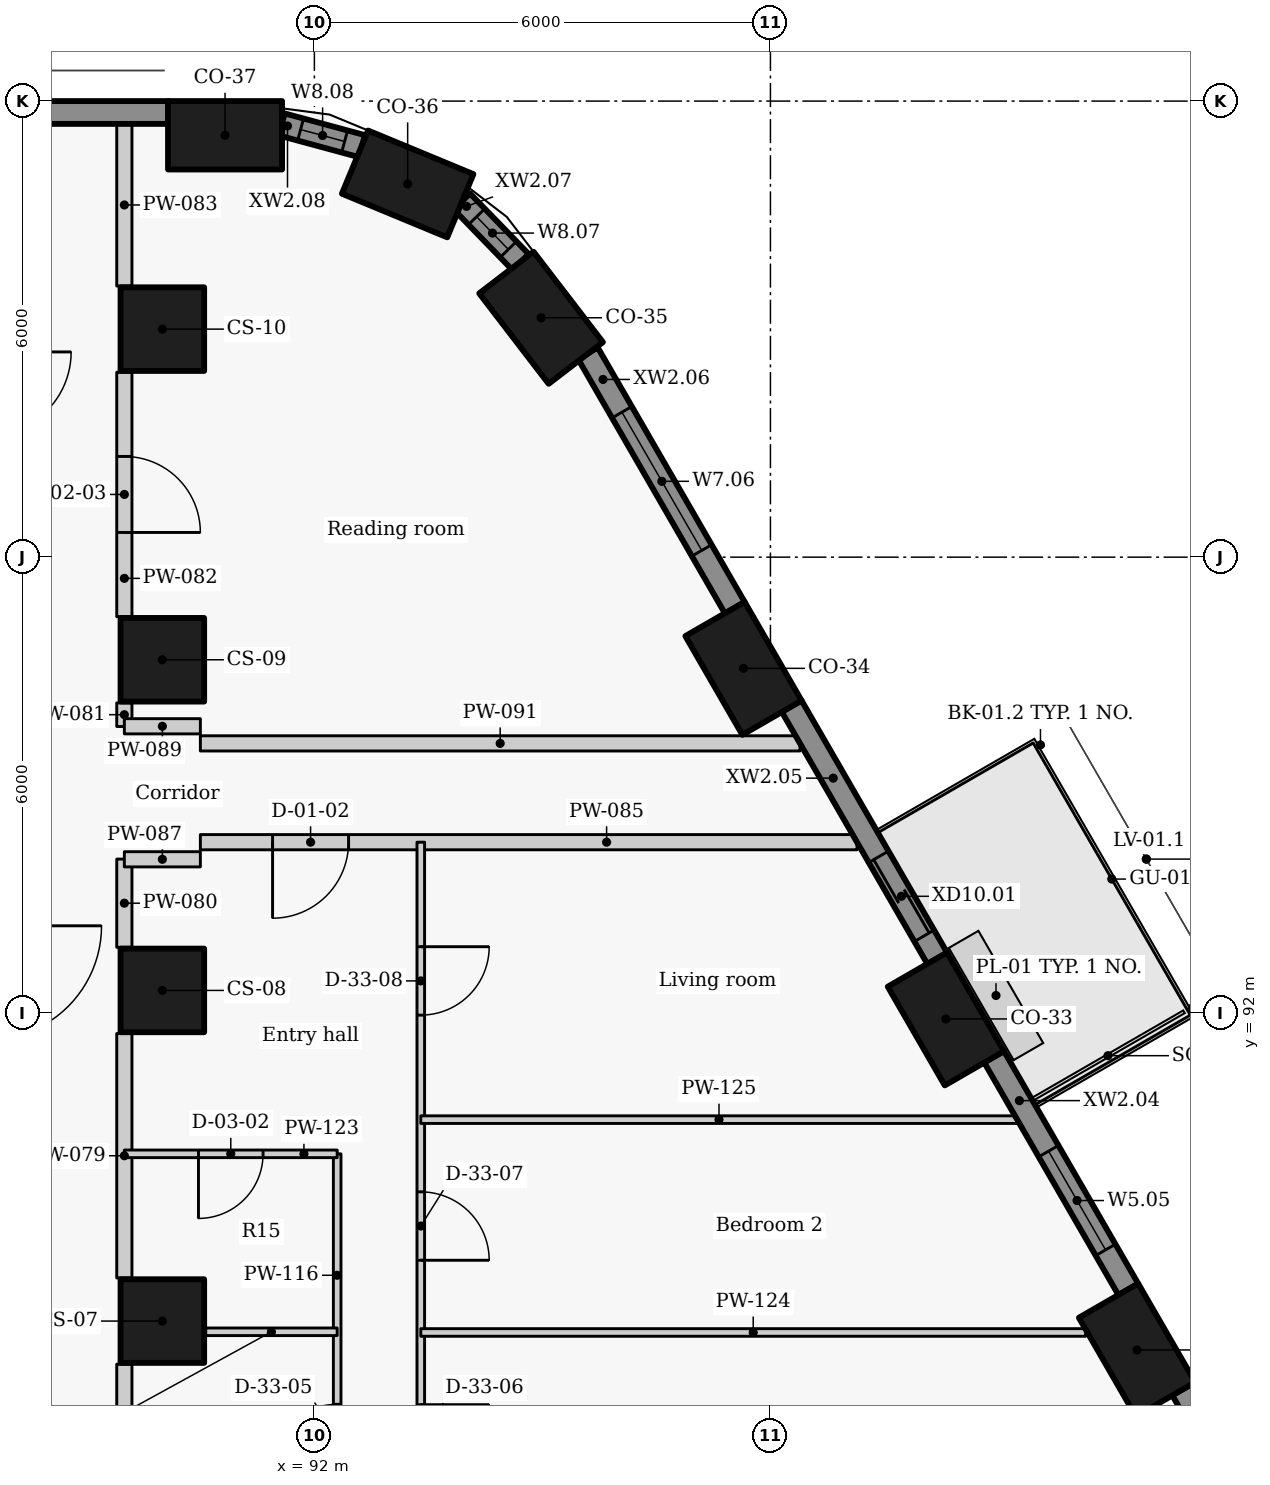
"""IFC4 building model, lengths in metres.
Left out: names, types, materials, properties, quantities, classifications, styles, units other than length and angle.
Written with IfcOpenShell. Run it as: python <this file> out.ifc"""

import sys

from ifc_helpers import new_model, si_unit, direction, frame, frame_2d, origin, origin_2d, place, context, subcontext, project, spatial, rectangle, extrude, element, fill, save


model = new_model("IFC4")
c1 = context("Model", 3, precision=1e-05, world=origin(), true_north=direction((0.0, 1.0)))
c2 = subcontext(c1, "Body", "Model", "MODEL_VIEW")
j1 = project(units=[si_unit("LENGTHUNIT", "METRE"), si_unit("PLANEANGLEUNIT", "RADIAN")], contexts=[c1])
p1 = place(None, origin())
s1 = spatial("IfcSite", under=j1, at=p1, CompositionType="ELEMENT")
p2 = place(p1, origin())
s2 = spatial("IfcBuilding", under=s1, at=p2, CompositionType="ELEMENT")
p3 = place(p2, frame((0.0, 0.0, 61.2)))
s3 = spatial("IfcBuildingStorey", under=s2, at=p3, CompositionType="ELEMENT", Elevation=61.2)
for number, where, z_axis, x_axis in (
    (1, (102.823, 87.57, 0.0), (0.0, 0.0, 1.0), (-0.5, 0.866, 0.0)),
    (2, (100.308, 91.925, 0.0), (0.0, 0.0, 1.0), (-0.5, 0.866, 0.0)),
    (3, (97.646, 96.537, 0.0), (0.0, 0.0, 1.0), (-0.5, 0.866, 0.0)),
    (4, (94.982, 101.149, 0.0), (0.0, 0.0, 1.0), (-0.609, 0.793, 0.0)),
    (5, (93.227, 102.91, 0.0), (0.0, 0.0, 1.0), (-0.924, 0.383, 0.0)),
    (6, (90.825, 103.55, 0.0), (0.0, 0.0, 1.0), (-1.0, 0.0, 0.0)),
):
    element("IfcColumn", number, at=place(p3, frame(where, z_axis=z_axis, x_axis=x_axis)), inside=s3, PredefinedType="COLUMN", context=c2, shape_type="SweptSolid", body=[
        extrude(rectangle(XDim=1.5, YDim=0.9, at=origin_2d()), origin(), (0.0, 0.0, 1.0), 3.3),
    ])
for number, where, z_axis, x_axis in (
    (7, (90.0, 87.95, 0.0), (0.0, 0.0, 1.0), (0.0, 1.0, 0.0)),
    (8, (90.0, 92.3, 0.0), (0.0, 0.0, 1.0), (0.0, 1.0, 0.0)),
    (9, (90.0, 96.65, 0.0), (0.0, 0.0, 1.0), (0.0, 1.0, 0.0)),
    (10, (90.0, 101.0, 0.0), (0.0, 0.0, 1.0), (0.0, 1.0, 0.0)),
):
    element("IfcColumn", number, at=place(p3, frame(where, z_axis=z_axis, x_axis=x_axis)), inside=s3, PredefinedType="COLUMN", context=c2, shape_type="SweptSolid", body=[
        extrude(rectangle(XDim=1.1, YDim=1.1, at=origin_2d()), origin(), (0.0, 0.0, 1.0), 3.3),
    ])
p4 = place(p3, frame((106.186, 82.153, 0.0), z_axis=(0.0, 0.0, 1.0), x_axis=(-0.492363204642, 0.870389840655, 0.0)))
e11 = element("IfcWall", 11, at=p4, inside=s3, PredefinedType="SOLIDWALL", context=c2, shape_type="SweptSolid", body=[
    extrude(rectangle(XDim=5.626, YDim=0.3, at=frame_2d((2.813, 0.0))), origin(), (0.0, 0.0, 1.0), 2.425),
])
p5 = place(p4, frame((0.909, 0.0, 0.9)))
e12 = element("IfcOpeningElement", 12, at=p5, cuts=e11, PredefinedType="OPENING", context=c2, shape_type="SweptSolid", body=[
    extrude(rectangle(XDim=2.1, YDim=1.1, at=frame_2d((1.05, 0.55))), frame((0.0, 0.16, 0.0), z_axis=(0.0, -1.0, 0.0), x_axis=(1.0, 0.0, 0.0)), (0.0, 0.0, 1.0), 0.32),
])
p6 = place(p4, frame((3.734, 0.0, 0.9)))
e13 = element("IfcOpeningElement", 13, at=p6, cuts=e11, PredefinedType="OPENING", context=c2, shape_type="SweptSolid", body=[
    extrude(rectangle(XDim=1.5, YDim=1.1, at=frame_2d((0.75, 0.55))), frame((0.0, 0.16, 0.0), z_axis=(0.0, -1.0, 0.0), x_axis=(1.0, 0.0, 0.0)), (0.0, 0.0, 1.0), 0.32),
])
p7 = place(p3, frame((102.71, 88.366, 0.0), z_axis=(0.0, 0.0, 1.0), x_axis=(-0.499977402622, 0.866038449993, 0.0)))
e14 = element("IfcWall", 14, at=p7, inside=s3, PredefinedType="SOLIDWALL", context=c2, shape_type="SweptSolid", body=[
    extrude(rectangle(XDim=3.537, YDim=0.3, at=frame_2d((1.769, 0.0))), origin(), (0.0, 0.0, 1.0), 2.425),
])
p8 = place(p7, frame((0.601, 0.0, 0.9)))
e15 = element("IfcOpeningElement", 15, at=p8, cuts=e14, PredefinedType="OPENING", context=c2, shape_type="SweptSolid", body=[
    extrude(rectangle(XDim=1.5, YDim=1.1, at=frame_2d((0.75, 0.55))), frame((0.0, 0.16, 0.0), z_axis=(0.0, -1.0, 0.0), x_axis=(1.0, 0.0, 0.0)), (0.0, 0.0, 1.0), 0.32),
])
p9 = place(p3, frame((100.195, 92.721, 0.0), z_axis=(0.0, 0.0, 1.0), x_axis=(-0.500001735503, 0.866024401789, 0.0)))
e16 = element("IfcWall", 16, at=p9, inside=s3, PredefinedType="SOLIDWALL", context=c2, shape_type="SweptSolid", body=[
    extrude(rectangle(XDim=3.834, YDim=0.3, at=frame_2d((1.917, 0.0))), origin(), (0.0, 0.0, 1.0), 2.425),
])
p10 = place(p9, frame((0.344, 0.0, 0.0)))
e17 = element("IfcOpeningElement", 17, at=p10, cuts=e16, PredefinedType="OPENING", context=c2, shape_type="SweptSolid", body=[
    extrude(rectangle(XDim=1.2, YDim=2.0, at=frame_2d((0.6, 1.0))), frame((0.0, 0.16, 0.0), z_axis=(0.0, -1.0, 0.0), x_axis=(1.0, 0.0, 0.0)), (0.0, 0.0, 1.0), 0.32),
])
p11 = place(p3, frame((97.532, 97.333, 0.0), z_axis=(0.0, 0.0, 1.0), x_axis=(-0.499948341072, 0.866055227026, 0.0)))
e18 = element("IfcWall", 18, at=p11, inside=s3, PredefinedType="SOLIDWALL", context=c2, shape_type="SweptSolid", body=[
    extrude(rectangle(XDim=3.867, YDim=0.3, at=frame_2d((1.934, 0.0))), origin(), (0.0, 0.0, 1.0), 2.425),
])
p12 = place(p11, frame((0.872, 0.0, 0.9)))
e19 = element("IfcOpeningElement", 19, at=p12, cuts=e18, PredefinedType="OPENING", context=c2, shape_type="SweptSolid", body=[
    extrude(rectangle(XDim=2.1, YDim=1.1, at=frame_2d((1.05, 0.55))), frame((0.0, 0.16, 0.0), z_axis=(0.0, -1.0, 0.0), x_axis=(1.0, 0.0, 0.0)), (0.0, 0.0, 1.0), 0.32),
])
p13 = place(p3, frame((94.713, 101.883, 0.0), z_axis=(0.0, 0.0, 1.0), x_axis=(-0.696138968055, 0.717907053285, 0.0)))
e20 = element("IfcWall", 20, at=p13, inside=s3, PredefinedType="SOLIDWALL", context=c2, shape_type="SweptSolid", body=[
    extrude(rectangle(XDim=1.11, YDim=0.3, at=frame_2d((0.555, 0.0))), origin(), (0.0, 0.0, 1.0), 2.425),
])
p14 = place(p13, frame((0.231, 0.0, 0.9)))
e21 = element("IfcOpeningElement", 21, at=p14, cuts=e20, PredefinedType="OPENING", context=c2, shape_type="SweptSolid", body=[
    extrude(rectangle(XDim=0.6, YDim=1.1, at=frame_2d((0.3, 0.55))), frame((0.0, 0.16, 0.0), z_axis=(0.0, -1.0, 0.0), x_axis=(1.0, 0.0, 0.0)), (0.0, 0.0, 1.0), 0.32),
])
p15 = place(p3, frame((92.625, 103.407, 0.0), z_axis=(0.0, 0.0, 1.0), x_axis=(-0.96522637192, 0.261415475728, 0.0)))
e22 = element("IfcWall", 22, at=p15, inside=s3, PredefinedType="SOLIDWALL", context=c2, shape_type="SweptSolid", body=[
    extrude(rectangle(XDim=1.093, YDim=0.3, at=frame_2d((0.546, 0.0))), origin(), (0.0, 0.0, 1.0), 2.425),
])
p16 = place(p15, frame((0.236, 0.0, 0.9)))
e23 = element("IfcOpeningElement", 23, at=p16, cuts=e22, PredefinedType="OPENING", context=c2, shape_type="SweptSolid", body=[
    extrude(rectangle(XDim=0.6, YDim=1.1, at=frame_2d((0.3, 0.55))), frame((0.0, 0.16, 0.0), z_axis=(0.0, -1.0, 0.0), x_axis=(1.0, 0.0, 0.0)), (0.0, 0.0, 1.0), 0.32),
])
p17 = place(p3, frame((90.079, 103.85, 0.0), z_axis=(0.0, 0.0, 1.0), x_axis=(-1.0, 0.0, 0.0)))
e24 = element("IfcWall", 24, at=p17, inside=s3, PredefinedType="SOLIDWALL", context=c2, shape_type="SweptSolid", body=[
    extrude(rectangle(XDim=20.19, YDim=0.3, at=frame_2d((10.095, 0.0))), origin(), (0.0, 0.0, 1.0), 2.425),
])
p18 = place(p3, frame((89.5, 87.383, 0.0), z_axis=(0.0, 0.0, 1.0), x_axis=(0.0, -1.0, 0.0)))
e25 = element("IfcWall", 25, at=p18, inside=s3, PredefinedType="PARTITIONING", context=c2, shape_type="SweptSolid", body=[
    extrude(rectangle(XDim=3.986, YDim=0.2, at=frame_2d((1.993, 0.0))), origin(), (0.0, 0.0, 1.0), 3.025),
])
p19 = place(p18, frame((2.683, 0.0, 0.0)))
e26 = element("IfcOpeningElement", 26, at=p19, cuts=e25, PredefinedType="OPENING", context=c2, shape_type="SweptSolid", body=[
    extrude(rectangle(XDim=1.0, YDim=2.1, at=frame_2d((0.5, 1.05))), frame((0.0, 0.11, 0.0), z_axis=(0.0, -1.0, 0.0), x_axis=(1.0, 0.0, 0.0)), (0.0, 0.0, 1.0), 0.22),
])
p20 = place(p3, frame((89.5, 88.517, 0.0), z_axis=(0.0, 0.0, 1.0), x_axis=(0.0, 1.0, 0.0)))
e27 = element("IfcWall", 27, at=p20, inside=s3, PredefinedType="PARTITIONING", context=c2, shape_type="SweptSolid", body=[
    extrude(rectangle(XDim=3.216, YDim=0.2, at=frame_2d((1.608, 0.0))), origin(), (0.0, 0.0, 1.0), 3.025),
])
p21 = place(p3, frame((89.5, 92.867, 0.0), z_axis=(0.0, 0.0, 1.0), x_axis=(0.0, 1.0, 0.0)))
e28 = element("IfcWall", 28, at=p21, inside=s3, PredefinedType="PARTITIONING", context=c2, shape_type="SweptSolid", body=[
    extrude(rectangle(XDim=1.161, YDim=0.2, at=frame_2d((0.581, 0.0))), origin(), (0.0, 0.0, 1.0), 3.025),
])
p22 = place(p3, frame((89.5, 95.772, 0.0), z_axis=(0.0, 0.0, 1.0), x_axis=(0.0, 1.0, 0.0)))
e29 = element("IfcWall", 29, at=p22, inside=s3, PredefinedType="PARTITIONING", context=c2, shape_type="SweptSolid", body=[
    extrude(rectangle(XDim=0.311, YDim=0.2, at=frame_2d((0.156, 0.0))), origin(), (0.0, 0.0, 1.0), 3.025),
])
p23 = place(p3, frame((89.5, 100.433, 0.0), z_axis=(0.0, 0.0, 1.0), x_axis=(0.0, -1.0, 0.0)))
e30 = element("IfcWall", 30, at=p23, inside=s3, PredefinedType="PARTITIONING", context=c2, shape_type="SweptSolid", body=[
    extrude(rectangle(XDim=3.216, YDim=0.2, at=frame_2d((1.608, 0.0))), origin(), (0.0, 0.0, 1.0), 3.025),
])
p24 = place(p23, frame((1.108, 0.0, 0.0)))
e31 = element("IfcOpeningElement", 31, at=p24, cuts=e30, PredefinedType="OPENING", context=c2, shape_type="SweptSolid", body=[
    extrude(rectangle(XDim=1.0, YDim=2.1, at=frame_2d((0.5, 1.05))), frame((0.0, 0.11, 0.0), z_axis=(0.0, -1.0, 0.0), x_axis=(1.0, 0.0, 0.0)), (0.0, 0.0, 1.0), 0.22),
])
p25 = place(p3, frame((89.5, 101.567, 0.0), z_axis=(0.0, 0.0, 1.0), x_axis=(0.0, 1.0, 0.0)))
e32 = element("IfcWall", 32, at=p25, inside=s3, PredefinedType="PARTITIONING", context=c2, shape_type="SweptSolid", body=[
    extrude(rectangle(XDim=2.133, YDim=0.2, at=frame_2d((1.066, 0.0))), origin(), (0.0, 0.0, 1.0), 3.025),
])
p26 = place(p3, frame((99.139, 94.25, 0.0), z_axis=(0.0, 0.0, 1.0), x_axis=(-1.0, 0.0, 0.0)))
e33 = element("IfcWall", 33, at=p26, inside=s3, PredefinedType="PARTITIONING", context=c2, shape_type="SweptSolid", body=[
    extrude(rectangle(XDim=8.639, YDim=0.2, at=frame_2d((4.32, 0.0))), origin(), (0.0, 0.0, 1.0), 2.405),
])
p27 = place(p26, frame((6.689, 0.0, 0.0)))
e34 = element("IfcOpeningElement", 34, at=p27, cuts=e33, PredefinedType="OPENING", context=c2, shape_type="SweptSolid", body=[
    extrude(rectangle(XDim=1.0, YDim=2.1, at=frame_2d((0.5, 1.05))), frame((0.0, 0.11, 0.0), z_axis=(0.0, -1.0, 0.0), x_axis=(1.0, 0.0, 0.0)), (0.0, 0.0, 1.0), 0.22),
])
for number, where, z_axis, x_axis in (
    (35, (89.5, 94.025, 0.0), (0.0, 0.0, 1.0), (1.0, 0.0, 0.0)),
    (36, (89.5, 95.775, 0.0), (0.0, 0.0, 1.0), (1.0, 0.0, 0.0)),
):
    element("IfcWall", number, at=place(p3, frame(where, z_axis=z_axis, x_axis=x_axis)), inside=s3, PredefinedType="PARTITIONING", context=c2, shape_type="SweptSolid", body=[
        extrude(rectangle(XDim=1.0, YDim=0.2, at=frame_2d((0.5, 0.0))), origin(), (0.0, 0.0, 1.0), 2.505),
    ])
p28 = place(p3, frame((90.5, 95.55, 0.0), z_axis=(0.0, 0.0, 1.0), x_axis=(1.0, 0.0, 0.0)))
e37 = element("IfcWall", 37, at=p28, inside=s3, PredefinedType="PARTITIONING", context=c2, shape_type="SweptSolid", body=[
    extrude(rectangle(XDim=7.889, YDim=0.2, at=frame_2d((3.944, 0.0))), origin(), (0.0, 0.0, 1.0), 2.405),
])
p29 = place(p3, frame((92.3, 85.0, 0.0), z_axis=(0.0, 0.0, 1.0), x_axis=(0.0, 1.0, 0.0)))
e38 = element("IfcWall", 38, at=p29, inside=s3, PredefinedType="PARTITIONING", context=c2, shape_type="SweptSolid", body=[
    extrude(rectangle(XDim=5.15, YDim=0.1, at=frame_2d((2.575, 0.0))), origin(), (0.0, 0.0, 1.0), 3.025),
])
p30 = place(p29, frame((0.955, 0.0, 0.0)))
e39 = element("IfcOpeningElement", 39, at=p30, cuts=e38, PredefinedType="OPENING", context=c2, shape_type="SweptSolid", body=[
    extrude(rectangle(XDim=0.9, YDim=2.1, at=frame_2d((0.45, 1.05))), frame((0.0, 0.06, 0.0), z_axis=(0.0, -1.0, 0.0), x_axis=(1.0, 0.0, 0.0)), (0.0, 0.0, 1.0), 0.12),
])
p31 = place(p3, frame((93.4, 94.25, 0.0), z_axis=(0.0, 0.0, 1.0), x_axis=(0.0, -1.0, 0.0)))
e40 = element("IfcWall", 40, at=p31, inside=s3, PredefinedType="PARTITIONING", context=c2, shape_type="SweptSolid", body=[
    extrude(rectangle(XDim=19.25, YDim=0.1, at=frame_2d((9.625, 0.0))), origin(), (0.0, 0.0, 1.0), 3.025),
])
p32 = place(p31, frame((17.348, 0.0, 0.0)))
e41 = element("IfcOpeningElement", 41, at=p32, cuts=e40, PredefinedType="OPENING", context=c2, shape_type="SweptSolid", body=[
    extrude(rectangle(XDim=0.9, YDim=2.1, at=frame_2d((0.45, 1.05))), frame((0.0, 0.06, 0.0), z_axis=(0.0, -1.0, 0.0), x_axis=(1.0, 0.0, 0.0)), (0.0, 0.0, 1.0), 0.12),
])
p33 = place(p31, frame((14.445, 0.0, 0.0)))
e42 = element("IfcOpeningElement", 42, at=p33, cuts=e40, PredefinedType="OPENING", context=c2, shape_type="SweptSolid", body=[
    extrude(rectangle(XDim=0.9, YDim=2.1, at=frame_2d((0.45, 1.05))), frame((0.0, 0.06, 0.0), z_axis=(0.0, -1.0, 0.0), x_axis=(1.0, 0.0, 0.0)), (0.0, 0.0, 1.0), 0.12),
])
p34 = place(p31, frame((10.897, 0.0, 0.0)))
e43 = element("IfcOpeningElement", 43, at=p34, cuts=e40, PredefinedType="OPENING", context=c2, shape_type="SweptSolid", body=[
    extrude(rectangle(XDim=0.9, YDim=2.1, at=frame_2d((0.45, 1.05))), frame((0.0, 0.06, 0.0), z_axis=(0.0, -1.0, 0.0), x_axis=(1.0, 0.0, 0.0)), (0.0, 0.0, 1.0), 0.12),
])
p35 = place(p31, frame((7.4, 0.0, 0.0)))
e44 = element("IfcOpeningElement", 44, at=p35, cuts=e40, PredefinedType="OPENING", context=c2, shape_type="SweptSolid", body=[
    extrude(rectangle(XDim=0.9, YDim=2.1, at=frame_2d((0.45, 1.05))), frame((0.0, 0.06, 0.0), z_axis=(0.0, -1.0, 0.0), x_axis=(1.0, 0.0, 0.0)), (0.0, 0.0, 1.0), 0.12),
])
p36 = place(p31, frame((4.6, 0.0, 0.0)))
e45 = element("IfcOpeningElement", 45, at=p36, cuts=e40, PredefinedType="OPENING", context=c2, shape_type="SweptSolid", body=[
    extrude(rectangle(XDim=0.9, YDim=2.1, at=frame_2d((0.45, 1.05))), frame((0.0, 0.06, 0.0), z_axis=(0.0, -1.0, 0.0), x_axis=(1.0, 0.0, 0.0)), (0.0, 0.0, 1.0), 0.12),
])
p37 = place(p31, frame((1.375, 0.0, 0.0)))
e46 = element("IfcOpeningElement", 46, at=p37, cuts=e40, PredefinedType="OPENING", context=c2, shape_type="SweptSolid", body=[
    extrude(rectangle(XDim=0.9, YDim=2.1, at=frame_2d((0.45, 1.05))), frame((0.0, 0.06, 0.0), z_axis=(0.0, -1.0, 0.0), x_axis=(1.0, 0.0, 0.0)), (0.0, 0.0, 1.0), 0.12),
])
p38 = place(p3, frame((90.57, 87.809, 0.0), z_axis=(0.0, 0.0, 1.0), x_axis=(1.0, 0.0, 0.0)))
e47 = element("IfcWall", 47, at=p38, inside=s3, PredefinedType="PARTITIONING", context=c2, shape_type="SweptSolid", body=[
    extrude(rectangle(XDim=1.73, YDim=0.1, at=frame_2d((0.865, 0.0))), origin(), (0.0, 0.0, 1.0), 3.025),
])
p39 = place(p3, frame((92.3, 90.15, 0.0), z_axis=(0.0, 0.0, 1.0), x_axis=(-1.0, 0.0, 0.0)))
e48 = element("IfcWall", 48, at=p39, inside=s3, PredefinedType="PARTITIONING", context=c2, shape_type="SweptSolid", body=[
    extrude(rectangle(XDim=2.8, YDim=0.1, at=frame_2d((1.4, 0.0))), origin(), (0.0, 0.0, 1.0), 2.505),
])
p40 = place(p39, frame((0.975, 0.0, 0.0)))
e49 = element("IfcOpeningElement", 49, at=p40, cuts=e48, PredefinedType="OPENING", context=c2, shape_type="SweptSolid", body=[
    extrude(rectangle(XDim=0.85, YDim=2.1, at=frame_2d((0.425, 1.05))), frame((0.0, 0.06, 0.0), z_axis=(0.0, -1.0, 0.0), x_axis=(1.0, 0.0, 0.0)), (0.0, 0.0, 1.0), 0.12),
])
p41 = place(p3, frame((93.4, 87.8, 0.0), z_axis=(0.0, 0.0, 1.0), x_axis=(1.0, 0.0, 0.0)))
e50 = element("IfcWall", 50, at=p41, inside=s3, PredefinedType="PARTITIONING", context=c2, shape_type="SweptSolid", body=[
    extrude(rectangle(XDim=8.747, YDim=0.1, at=frame_2d((4.374, 0.0))), origin(), (0.0, 0.0, 1.0), 3.025),
])
p42 = place(p3, frame((93.4, 90.6, 0.0), z_axis=(0.0, 0.0, 1.0), x_axis=(1.0, 0.0, 0.0)))
e51 = element("IfcWall", 51, at=p42, inside=s3, PredefinedType="PARTITIONING", context=c2, shape_type="SweptSolid", body=[
    extrude(rectangle(XDim=7.846, YDim=0.1, at=frame_2d((3.923, 0.0))), origin(), (0.0, 0.0, 1.0), 2.405),
])
p43 = place(p8, origin())
e52 = element("IfcWindow", 52, at=p43, inside=s3, PartitioningType="SINGLE_PANEL", PredefinedType="WINDOW", context=c2, shape_type="SweptSolid", body=[
    extrude(rectangle(XDim=1.5, YDim=1.1, at=frame_2d((0.75, 0.55))), frame((0.0, 0.03, 0.0), z_axis=(0.0, -1.0, 0.0), x_axis=(1.0, 0.0, 0.0)), (0.0, 0.0, 1.0), 0.06),
])
fill(e15, e52)
p44 = place(p10, origin())
e53 = element("IfcDoor", 53, at=p44, inside=s3, OperationType="SLIDING_TO_LEFT", PredefinedType="DOOR", context=c2, shape_type="SweptSolid", body=[
    extrude(rectangle(XDim=1.2, YDim=2.0, at=frame_2d((0.6, 1.0))), frame((0.0, 0.025, 0.0), z_axis=(0.0, -1.0, 0.0), x_axis=(1.0, 0.0, 0.0)), (0.0, 0.0, 1.0), 0.05),
])
fill(e17, e53)
p45 = place(p12, origin())
e54 = element("IfcWindow", 54, at=p45, inside=s3, PartitioningType="SINGLE_PANEL", PredefinedType="WINDOW", context=c2, shape_type="SweptSolid", body=[
    extrude(rectangle(XDim=2.1, YDim=1.1, at=frame_2d((1.05, 0.55))), frame((0.0, 0.03, 0.0), z_axis=(0.0, -1.0, 0.0), x_axis=(1.0, 0.0, 0.0)), (0.0, 0.0, 1.0), 0.06),
])
fill(e19, e54)
p46 = place(p14, origin())
e55 = element("IfcWindow", 55, at=p46, inside=s3, PartitioningType="SINGLE_PANEL", PredefinedType="WINDOW", context=c2, shape_type="SweptSolid", body=[
    extrude(rectangle(XDim=0.6, YDim=1.1, at=frame_2d((0.3, 0.55))), frame((0.0, 0.03, 0.0), z_axis=(0.0, -1.0, 0.0), x_axis=(1.0, 0.0, 0.0)), (0.0, 0.0, 1.0), 0.06),
])
fill(e21, e55)
p47 = place(p16, origin())
e56 = element("IfcWindow", 56, at=p47, inside=s3, PartitioningType="SINGLE_PANEL", PredefinedType="WINDOW", context=c2, shape_type="SweptSolid", body=[
    extrude(rectangle(XDim=0.6, YDim=1.1, at=frame_2d((0.3, 0.55))), frame((0.0, 0.03, 0.0), z_axis=(0.0, -1.0, 0.0), x_axis=(1.0, 0.0, 0.0)), (0.0, 0.0, 1.0), 0.06),
])
fill(e23, e56)
p48 = place(p27, origin())
e57 = element("IfcDoor", 57, at=p48, inside=s3, OperationType="SINGLE_SWING_RIGHT", PredefinedType="DOOR", context=c2, shape_type="SweptSolid", body=[
    extrude(rectangle(XDim=1.0, YDim=2.1, at=frame_2d((0.5, 1.05))), frame((0.0, 0.025, 0.0), z_axis=(0.0, -1.0, 0.0), x_axis=(1.0, 0.0, 0.0)), (0.0, 0.0, 1.0), 0.05),
])
fill(e34, e57)
p49 = place(p30, origin())
e58 = element("IfcDoor", 58, at=p49, inside=s3, OperationType="SINGLE_SWING_LEFT", PredefinedType="DOOR", context=c2, shape_type="SweptSolid", body=[
    extrude(rectangle(XDim=0.9, YDim=2.1, at=frame_2d((0.45, 1.05))), frame((0.0, 0.025, 0.0), z_axis=(0.0, -1.0, 0.0), x_axis=(1.0, 0.0, 0.0)), (0.0, 0.0, 1.0), 0.05),
])
fill(e39, e58)
p50 = place(p40, origin())
e59 = element("IfcDoor", 59, at=p50, inside=s3, OperationType="SINGLE_SWING_RIGHT", PredefinedType="DOOR", context=c2, shape_type="SweptSolid", body=[
    extrude(rectangle(XDim=0.85, YDim=2.1, at=frame_2d((0.425, 1.05))), frame((0.0, 0.025, 0.0), z_axis=(0.0, -1.0, 0.0), x_axis=(1.0, 0.0, 0.0)), (0.0, 0.0, 1.0), 0.05),
])
fill(e49, e59)
p51 = place(p36, origin())
e60 = element("IfcDoor", 60, at=p51, inside=s3, OperationType="SINGLE_SWING_RIGHT", PredefinedType="DOOR", context=c2, shape_type="SweptSolid", body=[
    extrude(rectangle(XDim=0.9, YDim=2.1, at=frame_2d((0.45, 1.05))), frame((0.0, 0.025, 0.0), z_axis=(0.0, -1.0, 0.0), x_axis=(1.0, 0.0, 0.0)), (0.0, 0.0, 1.0), 0.05),
])
fill(e45, e60)
p52 = place(p37, origin())
e61 = element("IfcDoor", 61, at=p52, inside=s3, OperationType="SINGLE_SWING_LEFT", PredefinedType="DOOR", context=c2, shape_type="SweptSolid", body=[
    extrude(rectangle(XDim=0.9, YDim=2.1, at=frame_2d((0.45, 1.05))), frame((0.0, 0.025, 0.0), z_axis=(0.0, -1.0, 0.0), x_axis=(1.0, 0.0, 0.0)), (0.0, 0.0, 1.0), 0.05),
])
fill(e46, e61)
p53 = place(p24, origin())
e62 = element("IfcDoor", 62, at=p53, inside=s3, OperationType="SINGLE_SWING_RIGHT", PredefinedType="DOOR", context=c2, shape_type="SweptSolid", body=[
    extrude(rectangle(XDim=1.0, YDim=2.1, at=frame_2d((0.5, 1.05))), frame((0.0, 0.025, 0.0), z_axis=(0.0, -1.0, 0.0), x_axis=(1.0, 0.0, 0.0)), (0.0, 0.0, 1.0), 0.05),
])
fill(e31, e62)
save(model, sys.argv[1])
